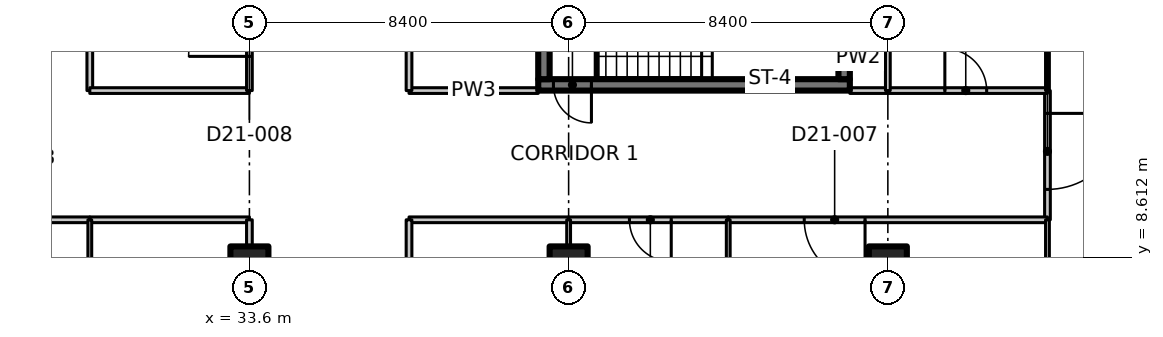
"""IFC4 building model, lengths in metres.
Left out: names, types, materials, properties, quantities, classifications, styles, units other than length and angle.
Written with IfcOpenShell. Run it as: python <this file> out.ifc"""

import sys

from ifc_helpers import new_model, si_unit, direction, frame, frame_2d, origin, origin_2d, place, context, subcontext, project, spatial, polyline, rectangle, outline, extrude, element, fill, save


model = new_model("IFC4")
c1 = context("Model", 3, precision=1e-05, world=origin(), true_north=direction((0.0, 1.0)))
c2 = subcontext(c1, "Body", "Model", "MODEL_VIEW")
j1 = project(units=[si_unit("LENGTHUNIT", "METRE"), si_unit("PLANEANGLEUNIT", "RADIAN")], contexts=[c1])
p1 = place(None, origin())
s1 = spatial("IfcSite", under=j1, at=p1, CompositionType="ELEMENT")
p2 = place(p1, origin())
s2 = spatial("IfcBuilding", under=s1, at=p2, CompositionType="ELEMENT")
p3 = place(p2, frame((0.0, 0.0, 174.0)))
s3 = spatial("IfcBuildingStorey", under=s2, at=p3, CompositionType="ELEMENT", Elevation=174.0)
for number, where, z_axis, x_axis in (
    (1, (33.6, 8.4, 0.0), (0.0, 0.0, 1.0), (1.0, 0.0, 0.0)),
    (2, (42.0, 8.4, 0.0), (0.0, 0.0, 1.0), (1.0, 0.0, 0.0)),
    (3, (50.4, 8.4, 0.0), (0.0, 0.0, 1.0), (1.0, 0.0, 0.0)),
):
    element("IfcColumn", number, at=place(p3, frame(where, z_axis=z_axis, x_axis=x_axis)), inside=s3, PredefinedType="COLUMN", context=c2, shape_type="SweptSolid", body=[
        extrude(rectangle(XDim=1.0, YDim=1.0, at=origin_2d()), origin(), (0.0, 0.0, 1.0), 3.35),
    ])
p4 = place(p3, frame((49.4, 13.15, 0.0), z_axis=(0.0, 0.0, 1.0), x_axis=(-1.0, 0.0, 0.0)))
e4 = element("IfcWall", 4, at=p4, inside=s3, PredefinedType="SHEAR", context=c2, shape_type="SweptSolid", body=[
    extrude(rectangle(XDim=8.2, YDim=0.3, at=frame_2d((4.1, 0.0))), origin(), (0.0, 0.0, 1.0), 3.35),
])
p5 = place(p4, frame((6.8, 0.0, 0.0)))
e5 = element("IfcOpeningElement", 5, at=p5, cuts=e4, PredefinedType="OPENING", context=c2, shape_type="SweptSolid", body=[
    extrude(rectangle(XDim=1.0, YDim=2.1, at=frame_2d((0.5, 1.05))), frame((0.0, 0.16, 0.0), z_axis=(0.0, -1.0, 0.0), x_axis=(1.0, 0.0, 0.0)), (0.0, 0.0, 1.0), 0.32),
])
for number, where, z_axis, x_axis in (
    (6, (41.35, 13.3, 0.0), (0.0, 0.0, 1.0), (0.0, 1.0, 0.0)),
    (7, (49.25, 13.3, 0.0), (0.0, 0.0, 1.0), (0.0, 1.0, 0.0)),
):
    element("IfcWall", number, at=place(p3, frame(where, z_axis=z_axis, x_axis=x_axis)), inside=s3, PredefinedType="SHEAR", context=c2, shape_type="SweptSolid", body=[
        extrude(rectangle(XDim=2.55, YDim=0.3, at=frame_2d((1.275, 0.0))), origin(), (0.0, 0.0, 1.0), 3.35),
    ])
p6 = place(p3, frame((29.4, 9.6, 0.0), z_axis=(0.0, 0.0, 1.0), x_axis=(-1.0, 0.0, 0.0)))
e8 = element("IfcWall", 8, at=p6, inside=s3, PredefinedType="PARTITIONING", context=c2, shape_type="SweptSolid", body=[
    extrude(rectangle(XDim=4.2, YDim=0.15, at=frame_2d((2.1, 0.0))), origin(), (0.0, 0.0, 1.0), 3.33),
])
p7 = place(p6, frame((1.5, 0.0, 0.0)))
e9 = element("IfcOpeningElement", 9, at=p7, cuts=e8, PredefinedType="OPENING", context=c2, shape_type="SweptSolid", body=[
    extrude(rectangle(XDim=1.1, YDim=2.1, at=frame_2d((0.55, 1.05))), frame((0.0, 0.085, 0.0), z_axis=(0.0, -1.0, 0.0), x_axis=(1.0, 0.0, 0.0)), (0.0, 0.0, 1.0), 0.17),
])
p8 = place(p3, frame((29.4, 21.2, 0.0), z_axis=(0.0, 0.0, 1.0), x_axis=(0.0, -1.0, 0.0)))
e10 = element("IfcWall", 10, at=p8, inside=s3, PredefinedType="PARTITIONING", context=c2, shape_type="SweptSolid", body=[
    extrude(rectangle(XDim=8.2, YDim=0.15, at=frame_2d((4.1, 0.0))), origin(), (0.0, 0.0, 1.0), 3.33),
])
p9 = place(p3, frame((54.6, 13.0, 0.0), z_axis=(0.0, 0.0, 1.0), x_axis=(0.0, -1.0, 0.0)))
e11 = element("IfcWall", 11, at=p9, inside=s3, PredefinedType="PARTITIONING", context=c2, shape_type="SweptSolid", body=[
    extrude(rectangle(XDim=3.4, YDim=0.15, at=frame_2d((1.7, 0.0))), origin(), (0.0, 0.0, 1.0), 3.33),
])
p10 = place(p9, frame((0.6, 0.0, 0.0)))
e12 = element("IfcOpeningElement", 12, at=p10, cuts=e11, PredefinedType="OPENING", context=c2, shape_type="SweptSolid", body=[
    extrude(rectangle(XDim=2.0, YDim=2.4, at=frame_2d((1.0, 1.2))), frame((0.0, 0.085, 0.0), z_axis=(0.0, -1.0, 0.0), x_axis=(1.0, 0.0, 0.0)), (0.0, 0.0, 1.0), 0.17),
])
p11 = place(p3, frame((33.6, 9.6, 0.0), z_axis=(0.0, 0.0, 1.0), x_axis=(-1.0, 0.0, 0.0)))
e13 = element("IfcWall", 13, at=p11, inside=s3, PredefinedType="PARTITIONING", context=c2, shape_type="SweptSolid", body=[
    extrude(rectangle(XDim=4.2, YDim=0.15, at=frame_2d((2.1, 0.0))), origin(), (0.0, 0.0, 1.0), 3.33),
])
p12 = place(p3, frame((42.0, 9.6, 0.0), z_axis=(0.0, 0.0, 1.0), x_axis=(-1.0, 0.0, 0.0)))
e14 = element("IfcWall", 14, at=p12, inside=s3, PredefinedType="PARTITIONING", context=c2, shape_type="SweptSolid", body=[
    extrude(rectangle(XDim=4.2, YDim=0.15, at=frame_2d((2.1, 0.0))), origin(), (0.0, 0.0, 1.0), 3.33),
])
p13 = place(p3, frame((46.2, 9.6, 0.0), z_axis=(0.0, 0.0, 1.0), x_axis=(-1.0, 0.0, 0.0)))
e15 = element("IfcWall", 15, at=p13, inside=s3, PredefinedType="PARTITIONING", context=c2, shape_type="SweptSolid", body=[
    extrude(rectangle(XDim=4.2, YDim=0.15, at=frame_2d((2.1, 0.0))), origin(), (0.0, 0.0, 1.0), 3.33),
])
p14 = place(p13, frame((1.5, 0.0, 0.0)))
e16 = element("IfcOpeningElement", 16, at=p14, cuts=e15, PredefinedType="OPENING", context=c2, shape_type="SweptSolid", body=[
    extrude(rectangle(XDim=1.1, YDim=2.1, at=frame_2d((0.55, 1.05))), frame((0.0, 0.085, 0.0), z_axis=(0.0, -1.0, 0.0), x_axis=(1.0, 0.0, 0.0)), (0.0, 0.0, 1.0), 0.17),
])
p15 = place(p3, frame((54.6, 9.6, 0.0), z_axis=(0.0, 0.0, 1.0), x_axis=(-1.0, 0.0, 0.0)))
e17 = element("IfcWall", 17, at=p15, inside=s3, PredefinedType="PARTITIONING", context=c2, shape_type="SweptSolid", body=[
    extrude(rectangle(XDim=8.4, YDim=0.15, at=frame_2d((4.2, 0.0))), origin(), (0.0, 0.0, 1.0), 3.33),
])
p16 = place(p15, frame((4.8, 0.0, 0.0)))
e18 = element("IfcOpeningElement", 18, at=p16, cuts=e17, PredefinedType="OPENING", context=c2, shape_type="SweptSolid", body=[
    extrude(rectangle(XDim=1.6, YDim=2.1, at=frame_2d((0.8, 1.05))), frame((0.0, 0.085, 0.0), z_axis=(0.0, -1.0, 0.0), x_axis=(1.0, 0.0, 0.0)), (0.0, 0.0, 1.0), 0.17),
])
p17 = place(p3, frame((29.4, 13.0, 0.0), z_axis=(0.0, 0.0, 1.0), x_axis=(1.0, 0.0, 0.0)))
e19 = element("IfcWall", 19, at=p17, inside=s3, PredefinedType="PARTITIONING", context=c2, shape_type="SweptSolid", body=[
    extrude(rectangle(XDim=4.2, YDim=0.15, at=frame_2d((2.1, 0.0))), origin(), (0.0, 0.0, 1.0), 3.33),
])
p18 = place(p3, frame((37.8, 13.0, 0.0), z_axis=(0.0, 0.0, 1.0), x_axis=(1.0, 0.0, 0.0)))
e20 = element("IfcWall", 20, at=p18, inside=s3, PredefinedType="PARTITIONING", context=c2, shape_type="SweptSolid", body=[
    extrude(rectangle(XDim=3.4, YDim=0.15, at=frame_2d((1.7, 0.0))), origin(), (0.0, 0.0, 1.0), 3.33),
])
p19 = place(p3, frame((49.4, 13.0, 0.0), z_axis=(0.0, 0.0, 1.0), x_axis=(1.0, 0.0, 0.0)))
e21 = element("IfcWall", 21, at=p19, inside=s3, PredefinedType="PARTITIONING", context=c2, shape_type="SweptSolid", body=[
    extrude(rectangle(XDim=1.0, YDim=0.15, at=frame_2d((0.5, 0.0))), origin(), (0.0, 0.0, 1.0), 3.33),
])
p20 = place(p3, frame((50.4, 13.0, 0.0), z_axis=(0.0, 0.0, 1.0), x_axis=(1.0, 0.0, 0.0)))
e22 = element("IfcWall", 22, at=p20, inside=s3, PredefinedType="PARTITIONING", context=c2, shape_type="SweptSolid", body=[
    extrude(rectangle(XDim=4.2, YDim=0.15, at=frame_2d((2.1, 0.0))), origin(), (0.0, 0.0, 1.0), 3.33),
])
p21 = place(p20, frame((1.5, 0.0, 0.0)))
e23 = element("IfcOpeningElement", 23, at=p21, cuts=e22, PredefinedType="OPENING", context=c2, shape_type="SweptSolid", body=[
    extrude(rectangle(XDim=1.1, YDim=2.1, at=frame_2d((0.55, 1.05))), frame((0.0, 0.085, 0.0), z_axis=(0.0, -1.0, 0.0), x_axis=(1.0, 0.0, 0.0)), (0.0, 0.0, 1.0), 0.17),
])
p22 = place(p3, frame((54.6, -0.2, 0.0), z_axis=(0.0, 0.0, 1.0), x_axis=(0.0, 1.0, 0.0)))
e24 = element("IfcWall", 24, at=p22, inside=s3, PredefinedType="PARTITIONING", context=c2, shape_type="SweptSolid", body=[
    extrude(outline(polyline([(0.0, 0.0), (9.8, 0.0), (9.8, 3.33), (5.066, 3.33), (5.064, 2.98), (3.736, 2.98), (3.734, 3.33), (0.0, 3.33), (0.0, 0.0)])), frame((0.0, 0.05, 0.0), z_axis=(0.0, -1.0, 0.0), x_axis=(1.0, 0.0, 0.0)), (0.0, 0.0, 1.0), 0.1),
])
p23 = place(p3, frame((54.6, 13.0, 0.0), z_axis=(0.0, 0.0, 1.0), x_axis=(0.0, 1.0, 0.0)))
e25 = element("IfcWall", 25, at=p23, inside=s3, PredefinedType="PARTITIONING", context=c2, shape_type="SweptSolid", body=[
    extrude(outline(polyline([(0.0, 0.0), (12.805, 0.0), (12.805, 3.33), (12.4, 3.33), (8.666, 3.33), (8.664, 2.98), (7.336, 2.98), (7.334, 3.33), (0.0, 3.33), (0.0, 0.0)])), frame((0.0, 0.05, 0.0), z_axis=(0.0, -1.0, 0.0), x_axis=(1.0, 0.0, 0.0)), (0.0, 0.0, 1.0), 0.1),
])
p24 = place(p3, frame((33.6, 8.92, 0.0), z_axis=(0.0, 0.0, 1.0), x_axis=(0.0, 1.0, 0.0)))
e26 = element("IfcWall", 26, at=p24, inside=s3, PredefinedType="PARTITIONING", context=c2, shape_type="SweptSolid", body=[
    extrude(rectangle(XDim=0.68, YDim=0.15, at=frame_2d((0.34, 0.0))), origin(), (0.0, 0.0, 1.0), 3.33),
])
p25 = place(p3, frame((37.8, 9.6, 0.0), z_axis=(0.0, 0.0, 1.0), x_axis=(0.0, -1.0, 0.0)))
e27 = element("IfcWall", 27, at=p25, inside=s3, PredefinedType="PARTITIONING", context=c2, shape_type="SweptSolid", body=[
    extrude(outline(polyline([(0.0, 0.0), (10.774, 0.0), (10.774, 3.33), (10.7, 3.33), (10.05, 3.33), (10.048, 2.98), (9.152, 2.98), (9.15, 3.33), (0.0, 3.33), (0.0, 0.0)])), frame((0.0, 0.075, 0.0), z_axis=(0.0, -1.0, 0.0), x_axis=(1.0, 0.0, 0.0)), (0.0, 0.0, 1.0), 0.15),
])
p26 = place(p25, frame((4.8, 0.0, 0.0)))
e28 = element("IfcOpeningElement", 28, at=p26, cuts=e27, PredefinedType="OPENING", context=c2, shape_type="SweptSolid", body=[
    extrude(rectangle(XDim=1.1, YDim=2.1, at=frame_2d((0.55, 1.05))), frame((0.0, 0.085, 0.0), z_axis=(0.0, -1.0, 0.0), x_axis=(1.0, 0.0, 0.0)), (0.0, 0.0, 1.0), 0.17),
])
p27 = place(p3, frame((29.4, 9.6, 0.0), z_axis=(0.0, 0.0, 1.0), x_axis=(0.0, -1.0, 0.0)))
e29 = element("IfcWall", 29, at=p27, inside=s3, PredefinedType="PARTITIONING", context=c2, shape_type="SweptSolid", body=[
    extrude(outline(polyline([(0.0, 0.0), (10.774, 0.0), (10.774, 3.33), (10.7, 3.33), (10.05, 3.33), (10.048, 2.98), (9.152, 2.98), (9.15, 3.33), (0.0, 3.33), (0.0, 0.0)])), frame((0.0, 0.05, 0.0), z_axis=(0.0, -1.0, 0.0), x_axis=(1.0, 0.0, 0.0)), (0.0, 0.0, 1.0), 0.1),
])
p28 = place(p3, frame((42.0, 9.6, 0.0), z_axis=(0.0, 0.0, 1.0), x_axis=(0.0, -1.0, 0.0)))
e30 = element("IfcWall", 30, at=p28, inside=s3, PredefinedType="PARTITIONING", context=c2, shape_type="SweptSolid", body=[
    extrude(rectangle(XDim=0.68, YDim=0.1, at=frame_2d((0.34, 0.0))), origin(), (0.0, 0.0, 1.0), 3.33),
])
p29 = place(p3, frame((46.2, 9.6, 0.0), z_axis=(0.0, 0.0, 1.0), x_axis=(0.0, -1.0, 0.0)))
e31 = element("IfcWall", 31, at=p29, inside=s3, PredefinedType="PARTITIONING", context=c2, shape_type="SweptSolid", body=[
    extrude(outline(polyline([(0.0, 0.0), (10.774, 0.0), (10.774, 3.33), (10.7, 3.33), (10.05, 3.33), (10.048, 2.98), (9.152, 2.98), (9.15, 3.33), (0.0, 3.33), (0.0, 0.0)])), frame((0.0, 0.05, 0.0), z_axis=(0.0, -1.0, 0.0), x_axis=(1.0, 0.0, 0.0)), (0.0, 0.0, 1.0), 0.1),
])
p30 = place(p3, frame((33.6, 13.0, 0.0), z_axis=(0.0, 0.0, 1.0), x_axis=(0.0, 1.0, 0.0)))
e32 = element("IfcWall", 32, at=p30, inside=s3, PredefinedType="PARTITIONING", context=c2, shape_type="SweptSolid", body=[
    extrude(rectangle(XDim=3.28, YDim=0.15, at=frame_2d((1.64, 0.0))), origin(), (0.0, 0.0, 1.0), 3.33),
])
p31 = place(p30, frame((0.9, 0.0, 0.0)))
e33 = element("IfcOpeningElement", 33, at=p31, cuts=e32, PredefinedType="OPENING", context=c2, shape_type="SweptSolid", body=[
    extrude(rectangle(XDim=1.6, YDim=2.1, at=frame_2d((0.8, 1.05))), frame((0.0, 0.085, 0.0), z_axis=(0.0, -1.0, 0.0), x_axis=(1.0, 0.0, 0.0)), (0.0, 0.0, 1.0), 0.17),
])
p32 = place(p3, frame((37.8, 30.526, 0.0), z_axis=(0.0, 0.0, 1.0), x_axis=(0.0, -1.0, 0.0)))
e34 = element("IfcWall", 34, at=p32, inside=s3, PredefinedType="PARTITIONING", context=c2, shape_type="SweptSolid", body=[
    extrude(outline(polyline([(0.0, 0.0), (17.526, 0.0), (17.526, 3.33), (5.776, 3.33), (5.774, 2.98), (4.878, 2.98), (4.876, 3.33), (0.283, 3.33), (0.0, 3.33), (0.0, 0.0)])), frame((0.0, 0.075, 0.0), z_axis=(0.0, -1.0, 0.0), x_axis=(1.0, 0.0, 0.0)), (0.0, 0.0, 1.0), 0.15),
])
p33 = place(p32, frame((8.283, 0.0, 0.0)))
e35 = element("IfcOpeningElement", 35, at=p33, cuts=e34, PredefinedType="OPENING", context=c2, shape_type="SweptSolid", body=[
    extrude(rectangle(XDim=1.6, YDim=2.1, at=frame_2d((0.8, 1.05))), frame((0.0, 0.085, 0.0), z_axis=(0.0, -1.0, 0.0), x_axis=(1.0, 0.0, 0.0)), (0.0, 0.0, 1.0), 0.17),
])
p34 = place(p3, frame((50.4, 16.28, 0.0), z_axis=(0.0, 0.0, 1.0), x_axis=(0.0, -1.0, 0.0)))
e36 = element("IfcWall", 36, at=p34, inside=s3, PredefinedType="PARTITIONING", context=c2, shape_type="SweptSolid", body=[
    extrude(rectangle(XDim=3.28, YDim=0.125, at=frame_2d((1.64, 0.0))), origin(), (0.0, 0.0, 1.0), 3.33),
])
p35 = place(p5, origin())
e37 = element("IfcDoor", 37, at=p35, inside=s3, OperationType="SINGLE_SWING_LEFT", PredefinedType="DOOR", context=c2, shape_type="SweptSolid", body=[
    extrude(rectangle(XDim=1.0, YDim=2.1, at=frame_2d((0.5, 1.05))), frame((0.0, 0.025, 0.0), z_axis=(0.0, -1.0, 0.0), x_axis=(1.0, 0.0, 0.0)), (0.0, 0.0, 1.0), 0.05),
])
fill(e5, e37)
p36 = place(p10, origin())
e38 = element("IfcDoor", 38, at=p36, inside=s3, OperationType="DOUBLE_DOOR_SINGLE_SWING", PredefinedType="DOOR", context=c2, shape_type="SweptSolid", body=[
    extrude(rectangle(XDim=2.0, YDim=2.4, at=frame_2d((1.0, 1.2))), frame((0.0, 0.025, 0.0), z_axis=(0.0, -1.0, 0.0), x_axis=(1.0, 0.0, 0.0)), (0.0, 0.0, 1.0), 0.05),
])
fill(e12, e38)
p37 = place(p14, origin())
e39 = element("IfcDoor", 39, at=p37, inside=s3, OperationType="SINGLE_SWING_LEFT", PredefinedType="DOOR", context=c2, shape_type="SweptSolid", body=[
    extrude(rectangle(XDim=1.1, YDim=2.1, at=frame_2d((0.55, 1.05))), frame((0.0, 0.025, 0.0), z_axis=(0.0, -1.0, 0.0), x_axis=(1.0, 0.0, 0.0)), (0.0, 0.0, 1.0), 0.05),
])
fill(e16, e39)
p38 = place(p16, origin())
e40 = element("IfcDoor", 40, at=p38, inside=s3, OperationType="DOUBLE_DOOR_SINGLE_SWING", PredefinedType="DOOR", context=c2, shape_type="SweptSolid", body=[
    extrude(rectangle(XDim=1.6, YDim=2.1, at=frame_2d((0.8, 1.05))), frame((0.0, 0.025, 0.0), z_axis=(0.0, -1.0, 0.0), x_axis=(1.0, 0.0, 0.0)), (0.0, 0.0, 1.0), 0.05),
])
fill(e18, e40)
p39 = place(p31, origin())
e41 = element("IfcDoor", 41, at=p39, inside=s3, OperationType="DOUBLE_DOOR_SINGLE_SWING", PredefinedType="DOOR", context=c2, shape_type="SweptSolid", body=[
    extrude(rectangle(XDim=1.6, YDim=2.1, at=frame_2d((0.8, 1.05))), frame((0.0, 0.025, 0.0), z_axis=(0.0, -1.0, 0.0), x_axis=(1.0, 0.0, 0.0)), (0.0, 0.0, 1.0), 0.05),
])
fill(e33, e41)
p40 = place(p21, origin())
e42 = element("IfcDoor", 42, at=p40, inside=s3, OperationType="SINGLE_SWING_LEFT", PredefinedType="DOOR", context=c2, shape_type="SweptSolid", body=[
    extrude(rectangle(XDim=1.1, YDim=2.1, at=frame_2d((0.55, 1.05))), frame((0.0, 0.025, 0.0), z_axis=(0.0, -1.0, 0.0), x_axis=(1.0, 0.0, 0.0)), (0.0, 0.0, 1.0), 0.05),
])
fill(e23, e42)
save(model, sys.argv[1])
